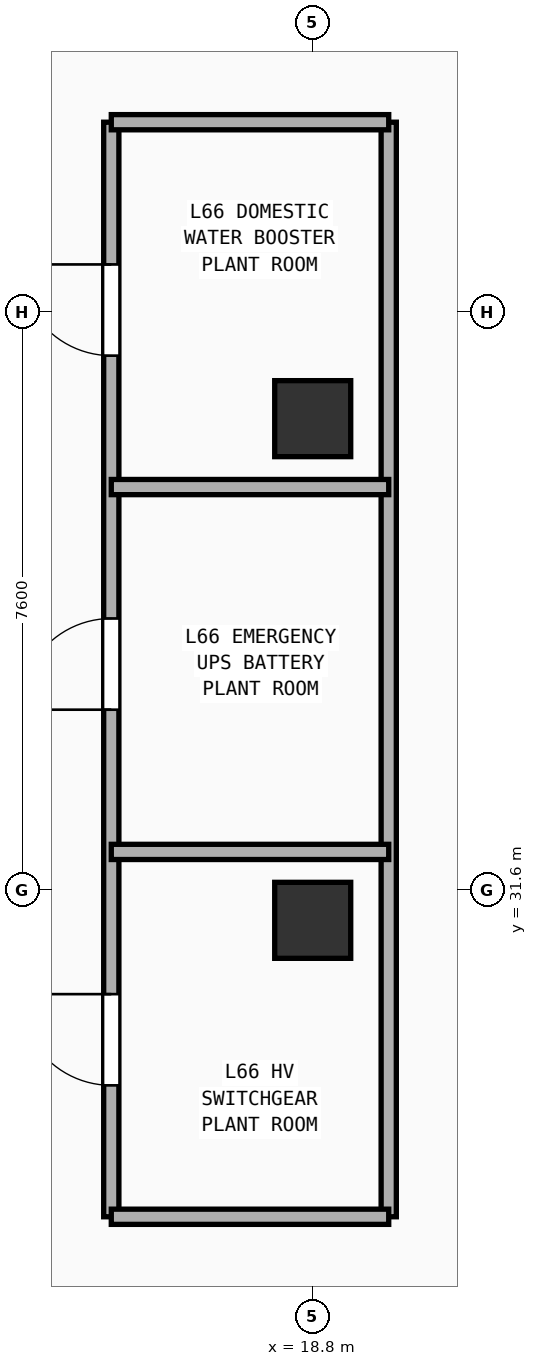
"""IFC4 building model, lengths in metres.
Left out: names, types, materials, properties, quantities, classifications, styles, units other than length and angle.
Written with IfcOpenShell. Run it as: python <this file> out.ifc"""

import sys

from ifc_helpers import new_model, si_unit, direction, frame, frame_2d, origin, origin_2d, place, context, subcontext, project, spatial, rectangle, extrude, element, fill, save


model = new_model("IFC4")
c1 = context("Model", 3, precision=1e-05, world=origin(), true_north=direction((0.0, 1.0)))
c2 = subcontext(c1, "Body", "Model", "MODEL_VIEW")
j1 = project(units=[si_unit("LENGTHUNIT", "METRE"), si_unit("PLANEANGLEUNIT", "RADIAN")], contexts=[c1])
p1 = place(None, origin())
s1 = spatial("IfcSite", under=j1, at=p1, CompositionType="ELEMENT")
p2 = place(p1, origin())
s2 = spatial("IfcBuilding", under=s1, at=p2, CompositionType="ELEMENT")
p3 = place(p2, frame((0.0, 0.0, 257.7)))
s3 = spatial("IfcBuildingStorey", under=s2, at=p3, CompositionType="ELEMENT", Elevation=257.7)
for number, where, z_axis, x_axis in (
    (1, (18.8, 31.2, 0.0), (0.0, 0.0, 1.0), (1.0, 0.0, 0.0)),
    (2, (18.8, 37.8, 0.0), (0.0, 0.0, 1.0), (1.0, 0.0, 0.0)),
):
    element("IfcColumn", number, at=place(p3, frame(where, z_axis=z_axis, x_axis=x_axis)), inside=s3, PredefinedType="COLUMN", context=c2, shape_type="SweptSolid", body=[
        extrude(rectangle(XDim=1.0, YDim=1.0, at=origin_2d()), origin(), (0.0, 0.0, 1.0), 4.86),
    ])
p4 = place(p3, frame((16.15, 27.3, 0.0), z_axis=(0.0, 0.0, 1.0), x_axis=(0.0, 1.0, 0.0)))
e3 = element("IfcWall", 3, at=p4, inside=s3, PredefinedType="PARTITIONING", context=c2, shape_type="SweptSolid", body=[
    extrude(rectangle(XDim=14.4, YDim=0.2, at=frame_2d((7.2, 0.0))), origin(), (0.0, 0.0, 1.0), 4.86),
])
p5 = place(p4, frame((1.729, 0.0, 0.0)))
e4 = element("IfcOpeningElement", 4, at=p5, cuts=e3, PredefinedType="OPENING", context=c2, shape_type="SweptSolid", body=[
    extrude(rectangle(XDim=1.2, YDim=2.25, at=frame_2d((0.6, 1.125))), frame((0.0, 0.11, 0.0), z_axis=(0.0, -1.0, 0.0), x_axis=(1.0, 0.0, 0.0)), (0.0, 0.0, 1.0), 0.22),
])
p6 = place(p4, frame((6.671, 0.0, 0.0)))
e5 = element("IfcOpeningElement", 5, at=p6, cuts=e3, PredefinedType="OPENING", context=c2, shape_type="SweptSolid", body=[
    extrude(rectangle(XDim=1.2, YDim=2.25, at=frame_2d((0.6, 1.125))), frame((0.0, 0.11, 0.0), z_axis=(0.0, -1.0, 0.0), x_axis=(1.0, 0.0, 0.0)), (0.0, 0.0, 1.0), 0.22),
])
p7 = place(p4, frame((11.329, 0.0, 0.0)))
e6 = element("IfcOpeningElement", 6, at=p7, cuts=e3, PredefinedType="OPENING", context=c2, shape_type="SweptSolid", body=[
    extrude(rectangle(XDim=1.2, YDim=2.25, at=frame_2d((0.6, 1.125))), frame((0.0, 0.11, 0.0), z_axis=(0.0, -1.0, 0.0), x_axis=(1.0, 0.0, 0.0)), (0.0, 0.0, 1.0), 0.22),
])
p8 = place(p3, frame((19.8, 27.3, 0.0), z_axis=(0.0, 0.0, 1.0), x_axis=(0.0, 1.0, 0.0)))
e7 = element("IfcWall", 7, at=p8, inside=s3, PredefinedType="PARTITIONING", context=c2, shape_type="SweptSolid", body=[
    extrude(rectangle(XDim=14.4, YDim=0.2, at=frame_2d((7.2, 0.0))), origin(), (0.0, 0.0, 1.0), 4.86),
])
for number, where, z_axis, x_axis in (
    (8, (16.15, 27.3, 0.0), (0.0, 0.0, 1.0), (1.0, 0.0, 0.0)),
    (9, (16.15, 41.7, 0.0), (0.0, 0.0, 1.0), (1.0, 0.0, 0.0)),
    (10, (16.15, 32.1, 0.0), (0.0, 0.0, 1.0), (1.0, 0.0, 0.0)),
    (11, (16.15, 36.9, 0.0), (0.0, 0.0, 1.0), (1.0, 0.0, 0.0)),
):
    element("IfcWall", number, at=place(p3, frame(where, z_axis=z_axis, x_axis=x_axis)), inside=s3, PredefinedType="PARTITIONING", context=c2, shape_type="SweptSolid", body=[
        extrude(rectangle(XDim=3.65, YDim=0.2, at=frame_2d((1.825, 0.0))), origin(), (0.0, 0.0, 1.0), 4.86),
    ])
p9 = place(p5, origin())
e12 = element("IfcDoor", 12, at=p9, inside=s3, OperationType="SINGLE_SWING_RIGHT", PredefinedType="DOOR", context=c2, shape_type="SweptSolid", body=[
    extrude(rectangle(XDim=1.2, YDim=2.25, at=frame_2d((0.6, 1.125))), frame((0.0, 0.025, 0.0), z_axis=(0.0, -1.0, 0.0), x_axis=(1.0, 0.0, 0.0)), (0.0, 0.0, 1.0), 0.05),
])
fill(e4, e12)
p10 = place(p6, origin())
e13 = element("IfcDoor", 13, at=p10, inside=s3, OperationType="SINGLE_SWING_LEFT", PredefinedType="DOOR", context=c2, shape_type="SweptSolid", body=[
    extrude(rectangle(XDim=1.2, YDim=2.25, at=frame_2d((0.6, 1.125))), frame((0.0, 0.025, 0.0), z_axis=(0.0, -1.0, 0.0), x_axis=(1.0, 0.0, 0.0)), (0.0, 0.0, 1.0), 0.05),
])
fill(e5, e13)
p11 = place(p7, origin())
e14 = element("IfcDoor", 14, at=p11, inside=s3, OperationType="SINGLE_SWING_RIGHT", PredefinedType="DOOR", context=c2, shape_type="SweptSolid", body=[
    extrude(rectangle(XDim=1.2, YDim=2.25, at=frame_2d((0.6, 1.125))), frame((0.0, 0.025, 0.0), z_axis=(0.0, -1.0, 0.0), x_axis=(1.0, 0.0, 0.0)), (0.0, 0.0, 1.0), 0.05),
])
fill(e6, e14)
save(model, sys.argv[1])
